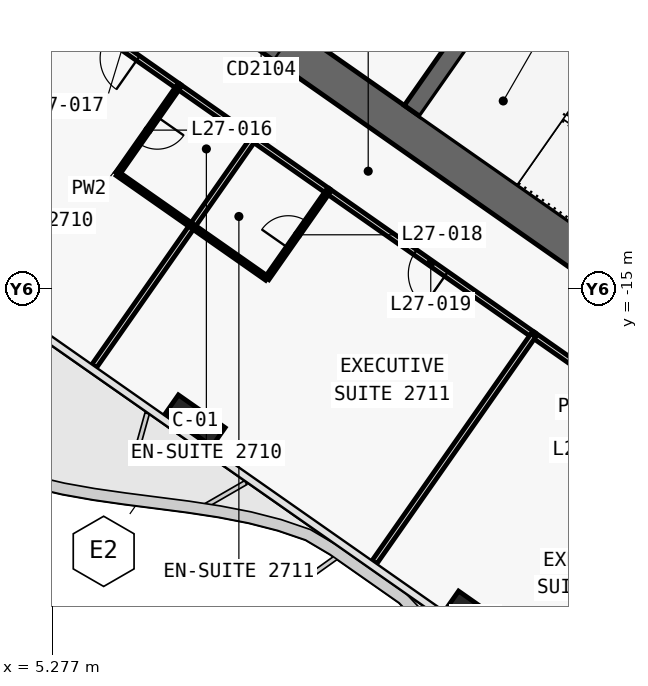
"""IFC4 building model, lengths in metres.
Left out: names, types, materials, properties, quantities, classifications, styles, units other than length and angle.
Written with IfcOpenShell. Run it as: python <this file> out.ifc"""

import sys

from ifc_helpers import new_model, si_unit, direction, frame, frame_2d, origin, origin_2d, place, context, subcontext, project, spatial, polyline, rectangle, outline, extrude, element, fill, save


model = new_model("IFC4")
c1 = context("Model", 3, precision=1e-05, world=origin(), true_north=direction((0.0, 1.0)))
c2 = subcontext(c1, "Body", "Model", "MODEL_VIEW")
j1 = project(units=[si_unit("LENGTHUNIT", "METRE"), si_unit("PLANEANGLEUNIT", "RADIAN")], contexts=[c1])
p1 = place(None, origin())
s1 = spatial("IfcSite", under=j1, at=p1, CompositionType="ELEMENT")
p2 = place(p1, origin())
s2 = spatial("IfcBuilding", under=s1, at=p2, CompositionType="ELEMENT")
p3 = place(p2, frame((0.0, 0.0, 122.9)))
s3 = spatial("IfcBuildingStorey", under=s2, at=p3, CompositionType="ELEMENT", Elevation=122.9)
p4 = place(p3, frame((-0.037, -0.585, 0.0), z_axis=(0.0, 0.0, 1.0), x_axis=(0.819157152511, -0.573569140985, 0.0)))
e1 = element("IfcWall", 1, at=p4, inside=s3, PredefinedType="SHEAR", context=c2, shape_type="SweptSolid", body=[
    extrude(outline(polyline([(26.695, 0.5), (0.0, 0.5), (0.7, -0.5), (26.695, -0.5), (26.695, 0.5)])), origin(), (0.0, 0.0, 1.0), 3.6),
])
p5 = place(p4, frame((1.245, 0.0, 0.0)))
e2 = element("IfcOpeningElement", 2, at=p5, cuts=e1, PredefinedType="OPENING", context=c2, shape_type="SweptSolid", body=[
    extrude(rectangle(XDim=1.5, YDim=2.1, at=frame_2d((0.75, 1.05))), frame((0.0, 0.51, 0.0), z_axis=(0.0, -1.0, 0.0), x_axis=(1.0, 0.0, 0.0)), (0.0, 0.0, 1.0), 1.02),
])
p6 = place(p4, frame((12.445, 0.0, 0.0)))
e3 = element("IfcOpeningElement", 3, at=p6, cuts=e1, PredefinedType="OPENING", context=c2, shape_type="SweptSolid", body=[
    extrude(rectangle(XDim=1.5, YDim=2.1, at=frame_2d((0.75, 1.05))), frame((0.0, 0.51, 0.0), z_axis=(0.0, -1.0, 0.0), x_axis=(1.0, 0.0, 0.0)), (0.0, 0.0, 1.0), 1.02),
])
p7 = place(p3, frame((14.745, -10.324, 0.0), z_axis=(0.0, 0.0, 1.0), x_axis=(0.57356780395, 0.819158088694, 0.0)))
e4 = element("IfcWall", 4, at=p7, inside=s3, PredefinedType="SHEAR", context=c2, shape_type="SweptSolid", body=[
    extrude(outline(polyline([(0.0, 0.25), (0.0, -0.25), (4.35, -0.25), (4.35, 0.25), (0.0, 0.25)])), origin(), (0.0, 0.0, 1.0), 3.6),
])
p8 = place(p3, frame((2.638, 3.768, 0.0), z_axis=(0.0, 0.0, 1.0), x_axis=(0.819148977158, -0.573580816643, 0.0)))
e5 = element("IfcWall", 5, at=p8, inside=s3, PredefinedType="SHEAR", context=c2, shape_type="SweptSolid", body=[
    extrude(outline(polyline([(0.0, 0.25), (0.0, -0.25), (26.0, -0.25), (26.0, 0.25), (0.0, 0.25)])), origin(), (0.0, 0.0, 1.0), 3.6),
])
p9 = place(p8, frame((9.637, 0.0, 0.0)))
e6 = element("IfcOpeningElement", 6, at=p9, cuts=e5, PredefinedType="OPENING", context=c2, shape_type="SweptSolid", body=[
    extrude(rectangle(XDim=1.2, YDim=2.1, at=frame_2d((0.6, 1.05))), frame((0.0, 0.26, 0.0), z_axis=(0.0, -1.0, 0.0), x_axis=(1.0, 0.0, 0.0)), (0.0, 0.0, 1.0), 0.52),
])
p10 = place(p8, frame((11.812, 0.0, 0.0)))
e7 = element("IfcOpeningElement", 7, at=p10, cuts=e5, PredefinedType="OPENING", context=c2, shape_type="SweptSolid", body=[
    extrude(rectangle(XDim=1.2, YDim=2.1, at=frame_2d((0.6, 1.05))), frame((0.0, 0.26, 0.0), z_axis=(0.0, -1.0, 0.0), x_axis=(1.0, 0.0, 0.0)), (0.0, 0.0, 1.0), 0.52),
])
p11 = place(p8, frame((13.988, 0.0, 0.0)))
e8 = element("IfcOpeningElement", 8, at=p11, cuts=e5, PredefinedType="OPENING", context=c2, shape_type="SweptSolid", body=[
    extrude(rectangle(XDim=1.2, YDim=2.1, at=frame_2d((0.6, 1.05))), frame((0.0, 0.26, 0.0), z_axis=(0.0, -1.0, 0.0), x_axis=(1.0, 0.0, 0.0)), (0.0, 0.0, 1.0), 0.52),
])
p12 = place(p8, frame((16.262, 0.0, 0.0)))
e9 = element("IfcOpeningElement", 9, at=p12, cuts=e5, PredefinedType="OPENING", context=c2, shape_type="SweptSolid", body=[
    extrude(rectangle(XDim=1.0, YDim=2.1, at=frame_2d((0.5, 1.05))), frame((0.0, 0.26, 0.0), z_axis=(0.0, -1.0, 0.0), x_axis=(1.0, 0.0, 0.0)), (0.0, 0.0, 1.0), 0.52),
])
for number, where, z_axis, x_axis in (
    (10, (9.038, -18.475, 0.0), (0.0, 0.0, 1.0), (0.819, -0.574, 0.0)),
    (11, (16.41, -23.637, 0.0), (0.0, 0.0, 1.0), (0.819, -0.574, 0.0)),
):
    element("IfcColumn", number, at=place(p3, frame(where, z_axis=z_axis, x_axis=x_axis)), inside=s3, PredefinedType="COLUMN", context=c2, shape_type="SweptSolid", body=[
        extrude(rectangle(XDim=1.5, YDim=0.6, at=origin_2d()), origin(), (0.0, 0.0, 1.0), 3.6),
    ])
p13 = place(p3, frame((8.601, -9.685, 0.0), z_axis=(0.0, 0.0, 1.0), x_axis=(-0.819149096931, 0.573580645591, 0.0)))
e12 = element("IfcWall", 12, at=p13, inside=s3, PredefinedType="PARTITIONING", context=c2, shape_type="SweptSolid", body=[
    extrude(rectangle(XDim=3.601, YDim=0.15, at=frame_2d((1.8, 0.0))), origin(), (0.0, 0.0, 1.0), 2.6),
])
p14 = place(p13, frame((1.301, 0.0, 0.0)))
e13 = element("IfcOpeningElement", 13, at=p14, cuts=e12, PredefinedType="OPENING", context=c2, shape_type="SweptSolid", body=[
    extrude(rectangle(XDim=1.0, YDim=2.1, at=frame_2d((0.5, 1.05))), frame((0.0, 0.085, 0.0), z_axis=(0.0, -1.0, 0.0), x_axis=(1.0, 0.0, 0.0)), (0.0, 0.0, 1.0), 0.17),
])
p15 = place(p3, frame((10.568, -11.062, 0.0), z_axis=(0.0, 0.0, 1.0), x_axis=(-0.819146032251, 0.573585022335, 0.0)))
e14 = element("IfcWall", 14, at=p15, inside=s3, PredefinedType="PARTITIONING", context=c2, shape_type="SweptSolid", body=[
    extrude(rectangle(XDim=2.404, YDim=0.15, at=frame_2d((1.202, 0.0))), origin(), (0.0, 0.0, 1.0), 3.32),
])
p16 = place(p3, frame((17.941, -16.224, 0.0), z_axis=(0.0, 0.0, 1.0), x_axis=(-0.819153746897, 0.573574004767, 0.0)))
e15 = element("IfcWall", 15, at=p16, inside=s3, PredefinedType="PARTITIONING", context=c2, shape_type="SweptSolid", body=[
    extrude(rectangle(XDim=6.603, YDim=0.15, at=frame_2d((3.302, 0.0))), origin(), (0.0, 0.0, 1.0), 2.6),
])
p17 = place(p16, frame((2.802, 0.0, 0.0)))
e16 = element("IfcOpeningElement", 16, at=p17, cuts=e15, PredefinedType="OPENING", context=c2, shape_type="SweptSolid", body=[
    extrude(rectangle(XDim=1.0, YDim=2.1, at=frame_2d((0.5, 1.05))), frame((0.0, 0.085, 0.0), z_axis=(0.0, -1.0, 0.0), x_axis=(1.0, 0.0, 0.0)), (0.0, 0.0, 1.0), 0.17),
])
p18 = place(p3, frame((12.534, -12.439, 0.0), z_axis=(0.0, 0.0, 1.0), x_axis=(-0.819193748, 0.57351687267, 0.0)))
e17 = element("IfcWall", 17, at=p18, inside=s3, PredefinedType="PARTITIONING", context=c2, shape_type="SweptSolid", body=[
    extrude(rectangle(XDim=2.404, YDim=0.15, at=frame_2d((1.202, 0.0))), origin(), (0.0, 0.0, 1.0), 3.32),
])
p19 = place(p3, frame((23.346, -20.01, 0.0), z_axis=(0.0, 0.0, 1.0), x_axis=(-0.819153746897, 0.573574004767, 0.0)))
e18 = element("IfcWall", 18, at=p19, inside=s3, PredefinedType="PARTITIONING", context=c2, shape_type="SweptSolid", body=[
    extrude(rectangle(XDim=6.603, YDim=0.15, at=frame_2d((3.302, 0.0))), origin(), (0.0, 0.0, 1.0), 2.6),
])
p20 = place(p19, frame((2.801, 0.0, 0.0)))
e19 = element("IfcOpeningElement", 19, at=p20, cuts=e18, PredefinedType="OPENING", context=c2, shape_type="SweptSolid", body=[
    extrude(rectangle(XDim=1.0, YDim=2.1, at=frame_2d((0.5, 1.05))), frame((0.0, 0.085, 0.0), z_axis=(0.0, -1.0, 0.0), x_axis=(1.0, 0.0, 0.0)), (0.0, 0.0, 1.0), 0.17),
])
p21 = place(p3, frame((8.6, -9.684, 0.0), z_axis=(0.0, 0.0, 1.0), x_axis=(-0.573550118428, -0.819170471667, 0.0)))
e20 = element("IfcWall", 20, at=p21, inside=s3, PredefinedType="PARTITIONING", context=c2, shape_type="SweptSolid", body=[
    extrude(rectangle(XDim=2.8, YDim=0.12, at=frame_2d((1.4, 0.0))), origin(), (0.0, 0.0, 1.0), 3.32),
])
p22 = place(p21, frame((0.975, 0.0, 0.0)))
e21 = element("IfcOpeningElement", 21, at=p22, cuts=e20, PredefinedType="OPENING", context=c2, shape_type="SweptSolid", body=[
    extrude(rectangle(XDim=0.85, YDim=2.05, at=frame_2d((0.425, 1.025))), frame((0.0, 0.07, 0.0), z_axis=(0.0, -1.0, 0.0), x_axis=(1.0, 0.0, 0.0)), (0.0, 0.0, 1.0), 0.14),
])
p23 = place(p3, frame((6.994, -11.979, 0.0), z_axis=(0.0, 0.0, 1.0), x_axis=(0.819188907105, -0.573523787192, 0.0)))
e22 = element("IfcWall", 22, at=p23, inside=s3, PredefinedType="PARTITIONING", context=c2, shape_type="SweptSolid", body=[
    extrude(rectangle(XDim=2.4, YDim=0.12, at=frame_2d((1.2, 0.0))), origin(), (0.0, 0.0, 1.0), 3.32),
])
p24 = place(p3, frame((8.96, -13.355, 0.0), z_axis=(0.0, 0.0, 1.0), x_axis=(-0.573564311442, -0.819160534108, 0.0)))
e23 = element("IfcWall", 23, at=p24, inside=s3, PredefinedType="PARTITIONING", context=c2, shape_type="SweptSolid", body=[
    extrude(rectangle(XDim=4.499, YDim=0.15, at=frame_2d((2.25, 0.0))), origin(), (0.0, 0.0, 1.0), 2.5),
])
p25 = place(p3, frame((1.849, -13.051, 0.0), z_axis=(0.0, 0.0, 1.0), x_axis=(0.57357355307, 0.819154063177, 0.0)))
e24 = element("IfcWall", 24, at=p25, inside=s3, PredefinedType="PARTITIONING", context=c2, shape_type="SweptSolid", body=[
    extrude(rectangle(XDim=6.63, YDim=0.15, at=frame_2d((3.315, 0.0))), origin(), (0.0, 0.0, 1.0), 2.6),
])
p26 = place(p3, frame((10.567, -11.061, 0.0), z_axis=(0.0, 0.0, 1.0), x_axis=(-0.573608623498, -0.819129505664, 0.0)))
e25 = element("IfcWall", 25, at=p26, inside=s3, PredefinedType="PARTITIONING", context=c2, shape_type="SweptSolid", body=[
    extrude(rectangle(XDim=2.8, YDim=0.15, at=frame_2d((1.4, 0.0))), origin(), (0.0, 0.0, 1.0), 3.32),
])
p27 = place(p3, frame((8.96, -13.355, 0.0), z_axis=(0.0, 0.0, 1.0), x_axis=(0.819107643868, -0.573639841501, 0.0)))
e26 = element("IfcWall", 26, at=p27, inside=s3, PredefinedType="PARTITIONING", context=c2, shape_type="SweptSolid", body=[
    extrude(rectangle(XDim=2.4, YDim=0.12, at=frame_2d((1.2, 0.0))), origin(), (0.0, 0.0, 1.0), 3.32),
])
p28 = place(p3, frame((10.927, -14.732, 0.0), z_axis=(0.0, 0.0, 1.0), x_axis=(0.573550118428, 0.819170471667, 0.0)))
e27 = element("IfcWall", 27, at=p28, inside=s3, PredefinedType="PARTITIONING", context=c2, shape_type="SweptSolid", body=[
    extrude(rectangle(XDim=2.8, YDim=0.12, at=frame_2d((1.4, 0.0))), origin(), (0.0, 0.0, 1.0), 3.32),
])
p29 = place(p28, frame((0.975, 0.0, 0.0)))
e28 = element("IfcOpeningElement", 28, at=p29, cuts=e27, PredefinedType="OPENING", context=c2, shape_type="SweptSolid", body=[
    extrude(rectangle(XDim=0.85, YDim=2.05, at=frame_2d((0.425, 1.025))), frame((0.0, 0.07, 0.0), z_axis=(0.0, -1.0, 0.0), x_axis=(1.0, 0.0, 0.0)), (0.0, 0.0, 1.0), 0.14),
])
p30 = place(p3, frame((17.939, -16.223, 0.0), z_axis=(0.0, 0.0, 1.0), x_axis=(-0.573594765376, -0.819139209862, 0.0)))
e29 = element("IfcWall", 29, at=p30, inside=s3, PredefinedType="PARTITIONING", context=c2, shape_type="SweptSolid", body=[
    extrude(rectangle(XDim=7.3, YDim=0.15, at=frame_2d((3.65, 0.0))), origin(), (0.0, 0.0, 1.0), 2.5),
])
p31 = place(p22, origin())
e30 = element("IfcDoor", 30, at=p31, inside=s3, OperationType="SINGLE_SWING_RIGHT", PredefinedType="DOOR", context=c2, shape_type="SweptSolid", body=[
    extrude(rectangle(XDim=0.85, YDim=2.05, at=frame_2d((0.425, 1.025))), frame((0.0, 0.025, 0.0), z_axis=(0.0, -1.0, 0.0), x_axis=(1.0, 0.0, 0.0)), (0.0, 0.0, 1.0), 0.05),
])
fill(e21, e30)
p32 = place(p14, origin())
e31 = element("IfcDoor", 31, at=p32, inside=s3, OperationType="SINGLE_SWING_LEFT", PredefinedType="DOOR", context=c2, shape_type="SweptSolid", body=[
    extrude(rectangle(XDim=1.0, YDim=2.1, at=frame_2d((0.5, 1.05))), frame((0.0, 0.025, 0.0), z_axis=(0.0, -1.0, 0.0), x_axis=(1.0, 0.0, 0.0)), (0.0, 0.0, 1.0), 0.05),
])
fill(e13, e31)
p33 = place(p29, origin())
e32 = element("IfcDoor", 32, at=p33, inside=s3, OperationType="SINGLE_SWING_RIGHT", PredefinedType="DOOR", context=c2, shape_type="SweptSolid", body=[
    extrude(rectangle(XDim=0.85, YDim=2.05, at=frame_2d((0.425, 1.025))), frame((0.0, 0.025, 0.0), z_axis=(0.0, -1.0, 0.0), x_axis=(1.0, 0.0, 0.0)), (0.0, 0.0, 1.0), 0.05),
])
fill(e28, e32)
p34 = place(p17, origin())
e33 = element("IfcDoor", 33, at=p34, inside=s3, OperationType="SINGLE_SWING_RIGHT", PredefinedType="DOOR", context=c2, shape_type="SweptSolid", body=[
    extrude(rectangle(XDim=1.0, YDim=2.1, at=frame_2d((0.5, 1.05))), frame((0.0, 0.025, 0.0), z_axis=(0.0, -1.0, 0.0), x_axis=(1.0, 0.0, 0.0)), (0.0, 0.0, 1.0), 0.05),
])
fill(e16, e33)
save(model, sys.argv[1])
